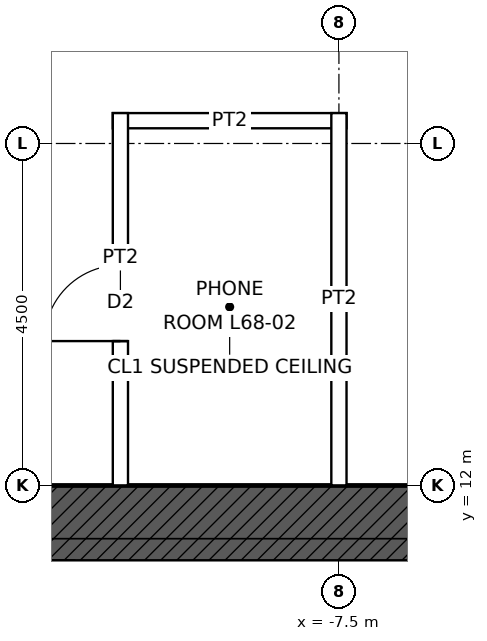
"""IFC4 building model, lengths in metres.
Left out: names, types, materials, properties, quantities, classifications, styles, units other than length and angle.
Written with IfcOpenShell. Run it as: python <this file> out.ifc"""

import sys

from ifc_helpers import new_model, si_unit, direction, frame, frame_2d, origin, place, context, subcontext, project, spatial, rectangle, extrude, element, fill, save


model = new_model("IFC4")
c1 = context("Model", 3, precision=1e-05, world=origin(), true_north=direction((0.0, 1.0)))
c2 = subcontext(c1, "Body", "Model", "MODEL_VIEW")
j1 = project(units=[si_unit("LENGTHUNIT", "METRE"), si_unit("PLANEANGLEUNIT", "RADIAN")], contexts=[c1])
p1 = place(None, origin())
s1 = spatial("IfcSite", under=j1, at=p1, CompositionType="ELEMENT")
p2 = place(p1, origin())
s2 = spatial("IfcBuilding", under=s1, at=p2, CompositionType="ELEMENT")
p3 = place(p2, frame((0.0, 0.0, 307.9)))
s3 = spatial("IfcBuildingStorey", under=s2, at=p3, CompositionType="ELEMENT", Elevation=307.9)
p4 = place(p3, frame((-12.0, 11.5, 0.0), z_axis=(0.0, 0.0, 1.0), x_axis=(1.0, 0.0, 0.0)))
e1 = element("IfcWall", 1, at=p4, inside=s3, PredefinedType="SHEAR", context=c2, shape_type="SweptSolid", body=[
    extrude(rectangle(XDim=24.0, YDim=1.0, at=frame_2d((12.0, 0.0))), origin(), (0.0, 0.0, 1.0), 4.0),
])
p5 = place(p4, frame((6.25, 0.0, 0.0)))
e2 = element("IfcOpeningElement", 2, at=p5, cuts=e1, PredefinedType="OPENING", context=c2, shape_type="SweptSolid", body=[
    extrude(rectangle(XDim=1.0, YDim=2.4, at=frame_2d((0.5, 1.2))), frame((0.0, 0.51, 0.0), z_axis=(0.0, -1.0, 0.0), x_axis=(1.0, 0.0, 0.0)), (0.0, 0.0, 1.0), 1.02),
])
p6 = place(p4, frame((16.75, 0.0, 0.0)))
e3 = element("IfcOpeningElement", 3, at=p6, cuts=e1, PredefinedType="OPENING", context=c2, shape_type="SweptSolid", body=[
    extrude(rectangle(XDim=1.0, YDim=2.4, at=frame_2d((0.5, 1.2))), frame((0.0, 0.51, 0.0), z_axis=(0.0, -1.0, 0.0), x_axis=(1.0, 0.0, 0.0)), (0.0, 0.0, 1.0), 1.02),
])
p7 = place(p3, frame((-10.475, 16.8, 0.0), z_axis=(0.0, 0.0, 1.0), x_axis=(1.0, 0.0, 0.0)))
e4 = element("IfcWall", 4, at=p7, inside=s3, PredefinedType="PARTITIONING", context=c2, shape_type="SweptSolid", body=[
    extrude(rectangle(XDim=3.075, YDim=0.2, at=frame_2d((1.538, 0.0))), origin(), (0.0, 0.0, 1.0), 3.85),
])
p8 = place(p3, frame((-10.375, 12.0, 0.0), z_axis=(0.0, 0.0, 1.0), x_axis=(0.0, 1.0, 0.0)))
e5 = element("IfcWall", 5, at=p8, inside=s3, PredefinedType="PARTITIONING", context=c2, shape_type="SweptSolid", body=[
    extrude(rectangle(XDim=4.9, YDim=0.2, at=frame_2d((2.45, 0.0))), origin(), (0.0, 0.0, 1.0), 3.85),
])
p9 = place(p8, frame((1.9, 0.0, 0.0)))
e6 = element("IfcOpeningElement", 6, at=p9, cuts=e5, PredefinedType="OPENING", context=c2, shape_type="SweptSolid", body=[
    extrude(rectangle(XDim=1.0, YDim=2.1, at=frame_2d((0.5, 1.05))), frame((0.0, 0.11, 0.0), z_axis=(0.0, -1.0, 0.0), x_axis=(1.0, 0.0, 0.0)), (0.0, 0.0, 1.0), 0.22),
])
p10 = place(p3, frame((-7.5, 12.0, 0.0), z_axis=(0.0, 0.0, 1.0), x_axis=(0.0, 1.0, 0.0)))
e7 = element("IfcWall", 7, at=p10, inside=s3, PredefinedType="PARTITIONING", context=c2, shape_type="SweptSolid", body=[
    extrude(rectangle(XDim=4.9, YDim=0.2, at=frame_2d((2.45, 0.0))), origin(), (0.0, 0.0, 1.0), 3.243),
])
p11 = place(p9, origin())
e8 = element("IfcDoor", 8, at=p11, inside=s3, OperationType="SINGLE_SWING_LEFT", PredefinedType="DOOR", context=c2, shape_type="SweptSolid", body=[
    extrude(rectangle(XDim=1.0, YDim=2.1, at=frame_2d((0.5, 1.05))), frame((0.0, 0.025, 0.0), z_axis=(0.0, -1.0, 0.0), x_axis=(1.0, 0.0, 0.0)), (0.0, 0.0, 1.0), 0.05),
])
fill(e6, e8)
save(model, sys.argv[1])
